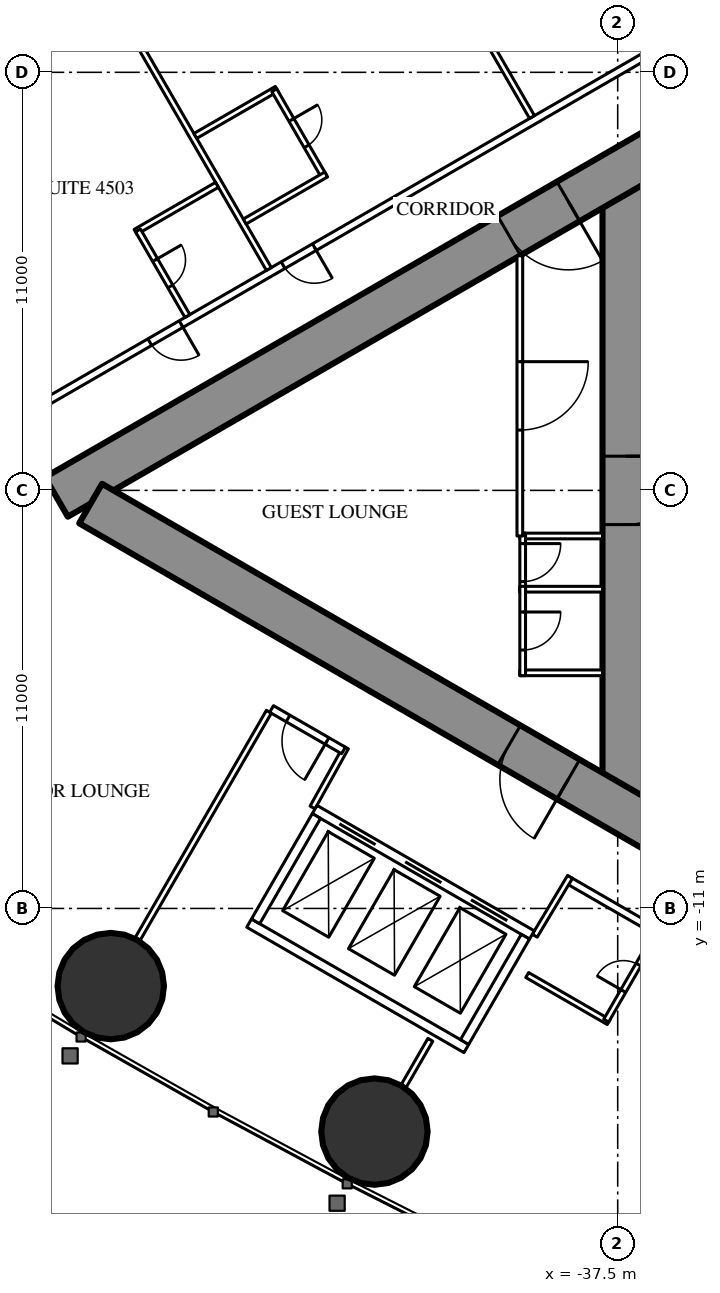
"""IFC4 building model, lengths in metres.
Left out: names, types, materials, properties, quantities, classifications, styles, units other than length and angle.
Written with IfcOpenShell. Run it as: python <this file> out.ifc"""

import sys

from ifc_helpers import new_model, si_unit, direction, frame, frame_2d, origin, origin_2d, place, context, subcontext, project, spatial, rectangle, circle, extrude, element, fill, save


model = new_model("IFC4")
c1 = context("Model", 3, precision=1e-05, world=origin(), true_north=direction((0.0, 1.0)))
c2 = subcontext(c1, "Body", "Model", "MODEL_VIEW")
j1 = project(units=[si_unit("LENGTHUNIT", "METRE"), si_unit("PLANEANGLEUNIT", "RADIAN")], contexts=[c1])
p1 = place(None, origin())
s1 = spatial("IfcSite", under=j1, at=p1, CompositionType="ELEMENT")
p2 = place(p1, origin())
s2 = spatial("IfcBuilding", under=s1, at=p2, CompositionType="ELEMENT")
p3 = place(p2, frame((0.0, 0.0, 170.3)))
s3 = spatial("IfcBuildingStorey", under=s2, at=p3, CompositionType="ELEMENT", Elevation=170.3)
for number, where, z_axis, x_axis in (
    (1, (-50.839, -13.043, 0.0), (0.0, 0.0, 1.0), (1.0, 0.0, 0.0)),
    (2, (-43.9, -16.871, 0.0), (0.0, 0.0, 1.0), (1.0, 0.0, 0.0)),
):
    element("IfcColumn", number, at=place(p3, frame(where, z_axis=z_axis, x_axis=x_axis)), inside=s3, PredefinedType="COLUMN", context=c2, shape_type="SweptSolid", body=[
        extrude(circle(Radius=1.4, at=origin_2d()), origin(), (0.0, 0.0, 1.0), 3.5),
    ])
p4 = place(p3, frame((-37.3, 8.6, 0.0), z_axis=(0.0, 0.0, 1.0), x_axis=(0.0, -1.0, 0.0)))
e3 = element("IfcWall", 3, at=p4, inside=s3, PredefinedType="SHEAR", context=c2, shape_type="SweptSolid", body=[
    extrude(rectangle(XDim=17.2, YDim=1.2, at=frame_2d((8.6, 0.0))), origin(), (0.0, 0.0, 1.0), 3.5),
])
p5 = place(p4, frame((7.7, 0.0, 0.0)))
e4 = element("IfcOpeningElement", 4, at=p5, cuts=e3, PredefinedType="OPENING", context=c2, shape_type="SweptSolid", body=[
    extrude(rectangle(XDim=1.8, YDim=2.2, at=frame_2d((0.9, 1.1))), frame((0.0, 0.61, 0.0), z_axis=(0.0, -1.0, 0.0), x_axis=(1.0, 0.0, 0.0)), (0.0, 0.0, 1.0), 1.22),
])
p6 = place(p3, frame((-27.2, 14.3, 0.0), z_axis=(0.0, 0.0, 1.0), x_axis=(-0.866026593062, -0.499997940104, 0.0)))
e5 = element("IfcWall", 5, at=p6, inside=s3, PredefinedType="SHEAR", context=c2, shape_type="SweptSolid", body=[
    extrude(rectangle(XDim=28.946, YDim=1.2, at=frame_2d((14.473, 0.0))), origin(), (0.0, 0.0, 1.0), 3.5),
])
p7 = place(p6, frame((4.6, 0.0, 0.0)))
e6 = element("IfcOpeningElement", 6, at=p7, cuts=e5, PredefinedType="OPENING", context=c2, shape_type="SweptSolid", body=[
    extrude(rectangle(XDim=1.0, YDim=2.2, at=frame_2d((0.5, 1.1))), frame((0.0, 0.61, 0.0), z_axis=(0.0, -1.0, 0.0), x_axis=(1.0, 0.0, 0.0)), (0.0, 0.0, 1.0), 1.22),
])
p8 = place(p6, frame((13.395, 0.0, 0.0)))
e7 = element("IfcOpeningElement", 7, at=p8, cuts=e5, PredefinedType="OPENING", context=c2, shape_type="SweptSolid", body=[
    extrude(rectangle(XDim=1.8, YDim=2.2, at=frame_2d((0.9, 1.1))), frame((0.0, 0.61, 0.0), z_axis=(0.0, -1.0, 0.0), x_axis=(1.0, 0.0, 0.0)), (0.0, 0.0, 1.0), 1.22),
])
p9 = place(p3, frame((-27.2, -14.3, 0.0), z_axis=(0.0, 0.0, 1.0), x_axis=(-0.866024021859, 0.500002393557, 0.0)))
e8 = element("IfcWall", 8, at=p9, inside=s3, PredefinedType="SHEAR", context=c2, shape_type="SweptSolid", body=[
    extrude(rectangle(XDim=27.907, YDim=1.2, at=frame_2d((13.954, 0.0))), origin(), (0.0, 0.0, 1.0), 3.5),
])
p10 = place(p9, frame((4.6, 0.0, 0.0)))
e9 = element("IfcOpeningElement", 9, at=p10, cuts=e8, PredefinedType="OPENING", context=c2, shape_type="SweptSolid", body=[
    extrude(rectangle(XDim=1.0, YDim=2.2, at=frame_2d((0.5, 1.1))), frame((0.0, 0.61, 0.0), z_axis=(0.0, -1.0, 0.0), x_axis=(1.0, 0.0, 0.0)), (0.0, 0.0, 1.0), 1.22),
])
p11 = place(p9, frame((13.395, 0.0, 0.0)))
e10 = element("IfcOpeningElement", 10, at=p11, cuts=e8, PredefinedType="OPENING", context=c2, shape_type="SweptSolid", body=[
    extrude(rectangle(XDim=1.8, YDim=2.2, at=frame_2d((0.9, 1.1))), frame((0.0, 0.61, 0.0), z_axis=(0.0, -1.0, 0.0), x_axis=(1.0, 0.0, 0.0)), (0.0, 0.0, 1.0), 1.22),
])
p12 = place(p3, frame((-27.86, 16.575, 0.0), z_axis=(0.0, 0.0, 1.0), x_axis=(-0.866025533911, -0.499999774615, 0.0)))
e11 = element("IfcWall", 11, at=p12, inside=s3, PredefinedType="PARTITIONING", context=c2, shape_type="SweptSolid", body=[
    extrude(rectangle(XDim=33.149, YDim=0.2, at=frame_2d((16.575, 0.0))), origin(), (0.0, 0.0, 1.0), 3.25),
])
p13 = place(p12, frame((3.75, 0.0, 0.0)))
e12 = element("IfcOpeningElement", 12, at=p13, cuts=e11, PredefinedType="OPENING", context=c2, shape_type="SweptSolid", body=[
    extrude(rectangle(XDim=1.0, YDim=2.2, at=frame_2d((0.5, 1.1))), frame((0.0, 0.11, 0.0), z_axis=(0.0, -1.0, 0.0), x_axis=(1.0, 0.0, 0.0)), (0.0, 0.0, 1.0), 0.22),
])
p14 = place(p12, frame((20.347, 0.0, 0.0)))
e13 = element("IfcOpeningElement", 13, at=p14, cuts=e11, PredefinedType="OPENING", context=c2, shape_type="SweptSolid", body=[
    extrude(rectangle(XDim=0.95, YDim=2.2, at=frame_2d((0.475, 1.1))), frame((0.0, 0.11, 0.0), z_axis=(0.0, -1.0, 0.0), x_axis=(1.0, 0.0, 0.0)), (0.0, 0.0, 1.0), 0.22),
])
p15 = place(p12, frame((24.397, 0.0, 0.0)))
e14 = element("IfcOpeningElement", 14, at=p15, cuts=e11, PredefinedType="OPENING", context=c2, shape_type="SweptSolid", body=[
    extrude(rectangle(XDim=0.95, YDim=2.2, at=frame_2d((0.475, 1.1))), frame((0.0, 0.11, 0.0), z_axis=(0.0, -1.0, 0.0), x_axis=(1.0, 0.0, 0.0)), (0.0, 0.0, 1.0), 0.22),
])
p16 = place(p12, frame((30.042, 0.0, 0.0)))
e15 = element("IfcOpeningElement", 15, at=p16, cuts=e11, PredefinedType="OPENING", context=c2, shape_type="SweptSolid", body=[
    extrude(rectangle(XDim=0.95, YDim=2.2, at=frame_2d((0.475, 1.1))), frame((0.0, 0.11, 0.0), z_axis=(0.0, -1.0, 0.0), x_axis=(1.0, 0.0, 0.0)), (0.0, 0.0, 1.0), 0.22),
])
p17 = place(p3, frame((-39.754, 9.823, 0.0), z_axis=(0.0, 0.0, 1.0), x_axis=(-0.499997670926, 0.866026748472, 0.0)))
e16 = element("IfcWall", 16, at=p17, inside=s3, PredefinedType="PARTITIONING", context=c2, shape_type="SweptSolid", body=[
    extrude(rectangle(XDim=6.757, YDim=0.15, at=frame_2d((3.379, 0.0))), origin(), (0.0, 0.0, 1.0), 2.3),
])
for number, where, z_axis, x_axis in (
    (17, (-46.679, 5.825, 0.0), (0.0, 0.0, 1.0), (-0.5, 0.866, 0.0)),
    (18, (-46.679, -5.825, 0.0), (0.0, 0.0, 1.0), (-0.5, -0.866, 0.0)),
):
    element("IfcWall", number, at=place(p3, frame(where, z_axis=z_axis, x_axis=x_axis)), inside=s3, PredefinedType="PARTITIONING", context=c2, shape_type="SweptSolid", body=[
        extrude(rectangle(XDim=6.911, YDim=0.15, at=frame_2d((3.456, 0.0))), origin(), (0.0, 0.0, 1.0), 2.3),
    ])
p18 = place(p3, frame((-42.429, -14.457, 0.0), z_axis=(0.0, 0.0, 1.0), x_axis=(-0.5000578829, -0.865991982497, 0.0)))
e19 = element("IfcWall", 19, at=p18, inside=s3, PredefinedType="PARTITIONING", context=c2, shape_type="SweptSolid", body=[
    extrude(rectangle(XDim=1.407, YDim=0.15, at=frame_2d((0.704, 0.0))), origin(), (0.0, 0.0, 1.0), 3.25),
])
p19 = place(p3, frame((-27.86, -16.575, 0.0), z_axis=(0.0, 0.0, 1.0), x_axis=(-0.866027756871, 0.499995924312, 0.0)))
e20 = element("IfcWall", 20, at=p19, inside=s3, PredefinedType="PARTITIONING", context=c2, shape_type="SweptSolid", body=[
    extrude(rectangle(XDim=12.622, YDim=0.2, at=frame_2d((6.311, 0.0))), origin(), (0.0, 0.0, 1.0), 3.25),
])
p20 = place(p19, frame((8.722, 0.0, 0.0)))
e21 = element("IfcOpeningElement", 21, at=p20, cuts=e20, PredefinedType="OPENING", context=c2, shape_type="SweptSolid", body=[
    extrude(rectangle(XDim=0.95, YDim=2.2, at=frame_2d((0.475, 1.1))), frame((0.0, 0.11, 0.0), z_axis=(0.0, -1.0, 0.0), x_axis=(1.0, 0.0, 0.0)), (0.0, 0.0, 1.0), 0.22),
])
for number, where, z_axis, x_axis in (
    (22, (-39.683, -11.718, 0.0), (0.0, 0.0, 1.0), (0.514, 0.858, 0.0)),
    (23, (-44.652, -6.764, 0.0), (0.0, 0.0, 1.0), (-0.485, -0.874, 0.0)),
):
    element("IfcWall", number, at=place(p3, frame(where, z_axis=z_axis, x_axis=x_axis)), inside=s3, PredefinedType="PARTITIONING", context=c2, shape_type="SweptSolid", body=[
        extrude(rectangle(XDim=1.805, YDim=0.15, at=frame_2d((0.903, 0.0))), origin(), (0.0, 0.0, 1.0), 3.25),
    ])
p21 = place(p3, frame((-44.715, -6.844, 0.0), z_axis=(0.0, 0.0, 1.0), x_axis=(-0.865999496279, 0.500044870432, 0.0)))
e24 = element("IfcWall", 24, at=p21, inside=s3, PredefinedType="PARTITIONING", context=c2, shape_type="SweptSolid", body=[
    extrude(rectangle(XDim=2.185, YDim=0.2, at=frame_2d((1.092, 0.0))), origin(), (0.0, 0.0, 1.0), 3.25),
])
p22 = place(p21, frame((0.5, 0.0, 0.0)))
e25 = element("IfcOpeningElement", 25, at=p22, cuts=e24, PredefinedType="OPENING", context=c2, shape_type="SweptSolid", body=[
    extrude(rectangle(XDim=1.185, YDim=2.2, at=frame_2d((0.593, 1.1))), frame((0.0, 0.11, 0.0), z_axis=(0.0, -1.0, 0.0), x_axis=(1.0, 0.0, 0.0)), (0.0, 0.0, 1.0), 0.22),
])
p23 = place(p3, frame((-46.47, 10.564, 0.0), z_axis=(0.0, 0.0, 1.0), x_axis=(-0.866006523861, -0.500032699561, 0.0)))
e26 = element("IfcWall", 26, at=p23, inside=s3, PredefinedType="PARTITIONING", context=c2, shape_type="SweptSolid", body=[
    extrude(rectangle(XDim=2.475, YDim=0.15, at=frame_2d((1.237, 0.0))), origin(), (0.0, 0.0, 1.0), 3.25),
])
p24 = place(p3, frame((-45.235, 8.275, 0.0), z_axis=(0.0, 0.0, 1.0), x_axis=(-0.500006934395, 0.866021400173, 0.0)))
e27 = element("IfcWall", 27, at=p24, inside=s3, PredefinedType="PARTITIONING", context=c2, shape_type="SweptSolid", body=[
    extrude(rectangle(XDim=2.6, YDim=0.15, at=frame_2d((1.3, 0.0))), origin(), (0.0, 0.0, 1.0), 3.25),
])
p25 = place(p24, frame((0.9, 0.0, 0.0)))
e28 = element("IfcOpeningElement", 28, at=p25, cuts=e27, PredefinedType="OPENING", context=c2, shape_type="SweptSolid", body=[
    extrude(rectangle(XDim=0.8, YDim=2.2, at=frame_2d((0.4, 1.1))), frame((0.0, 0.085, 0.0), z_axis=(0.0, -1.0, 0.0), x_axis=(1.0, 0.0, 0.0)), (0.0, 0.0, 1.0), 0.17),
])
for number, where, z_axis, x_axis in (
    (29, (-45.17, 8.312, 0.0), (0.0, 0.0, 1.0), (-0.866, -0.5, 0.0)),
    (30, (-48.044, 8.039, 0.0), (0.0, 0.0, 1.0), (-0.866, -0.5, 0.0)),
):
    element("IfcWall", number, at=place(p3, frame(where, z_axis=z_axis, x_axis=x_axis)), inside=s3, PredefinedType="PARTITIONING", context=c2, shape_type="SweptSolid", body=[
        extrude(rectangle(XDim=2.475, YDim=0.15, at=frame_2d((1.238, 0.0))), origin(), (0.0, 0.0, 1.0), 3.25),
    ])
p26 = place(p3, frame((-48.822, 4.588, 0.0), z_axis=(0.0, 0.0, 1.0), x_axis=(-0.500006934395, 0.866021400173, 0.0)))
e31 = element("IfcWall", 31, at=p26, inside=s3, PredefinedType="PARTITIONING", context=c2, shape_type="SweptSolid", body=[
    extrude(rectangle(XDim=2.6, YDim=0.15, at=frame_2d((1.3, 0.0))), origin(), (0.0, 0.0, 1.0), 3.25),
])
p27 = place(p26, frame((0.9, 0.0, 0.0)))
e32 = element("IfcOpeningElement", 32, at=p27, cuts=e31, PredefinedType="OPENING", context=c2, shape_type="SweptSolid", body=[
    extrude(rectangle(XDim=0.8, YDim=2.2, at=frame_2d((0.4, 1.1))), frame((0.0, 0.085, 0.0), z_axis=(0.0, -1.0, 0.0), x_axis=(1.0, 0.0, 0.0)), (0.0, 0.0, 1.0), 0.17),
])
p28 = place(p3, frame((-37.738, -13.989, 0.0), z_axis=(0.0, 0.0, 1.0), x_axis=(-0.86604923931, 0.499958713387, 0.0)))
e33 = element("IfcWall", 33, at=p28, inside=s3, PredefinedType="PARTITIONING", context=c2, shape_type="SweptSolid", body=[
    extrude(rectangle(XDim=2.475, YDim=0.15, at=frame_2d((1.237, 0.0))), origin(), (0.0, 0.0, 1.0), 3.25),
])
p29 = place(p3, frame((-36.503, -11.7, 0.0), z_axis=(0.0, 0.0, 1.0), x_axis=(-0.500006934395, -0.866021400173, 0.0)))
e34 = element("IfcWall", 34, at=p29, inside=s3, PredefinedType="PARTITIONING", context=c2, shape_type="SweptSolid", body=[
    extrude(rectangle(XDim=2.6, YDim=0.15, at=frame_2d((1.3, 0.0))), origin(), (0.0, 0.0, 1.0), 3.25),
])
p30 = place(p29, frame((0.9, 0.0, 0.0)))
e35 = element("IfcOpeningElement", 35, at=p30, cuts=e34, PredefinedType="OPENING", context=c2, shape_type="SweptSolid", body=[
    extrude(rectangle(XDim=0.8, YDim=2.2, at=frame_2d((0.4, 1.1))), frame((0.0, 0.085, 0.0), z_axis=(0.0, -1.0, 0.0), x_axis=(1.0, 0.0, 0.0)), (0.0, 0.0, 1.0), 0.17),
])
for number, where, z_axis, x_axis in (
    (36, (-37.9, -1.2, 0.0), (0.0, 0.0, 1.0), (-1.0, 0.0, 0.0)),
    (37, (-37.9, -2.6, 0.0), (0.0, 0.0, 1.0), (-1.0, 0.0, 0.0)),
    (38, (-37.9, -4.8, 0.0), (0.0, 0.0, 1.0), (-1.0, 0.0, 0.0)),
):
    element("IfcWall", number, at=place(p3, frame(where, z_axis=z_axis, x_axis=x_axis)), inside=s3, PredefinedType="PARTITIONING", context=c2, shape_type="SweptSolid", body=[
        extrude(rectangle(XDim=2.175, YDim=0.15, at=frame_2d((1.087, 0.0))), origin(), (0.0, 0.0, 1.0), 3.25),
    ])
p31 = place(p3, frame((-40.0, -1.125, 0.0), z_axis=(0.0, 0.0, 1.0), x_axis=(0.0, -1.0, 0.0)))
e39 = element("IfcWall", 39, at=p31, inside=s3, PredefinedType="PARTITIONING", context=c2, shape_type="SweptSolid", body=[
    extrude(rectangle(XDim=1.55, YDim=0.15, at=frame_2d((0.775, 0.0))), origin(), (0.0, 0.0, 1.0), 3.25),
])
p32 = place(p31, frame((0.275, 0.0, 0.0)))
e40 = element("IfcOpeningElement", 40, at=p32, cuts=e39, PredefinedType="OPENING", context=c2, shape_type="SweptSolid", body=[
    extrude(rectangle(XDim=1.0, YDim=2.2, at=frame_2d((0.5, 1.1))), frame((0.0, 0.085, 0.0), z_axis=(0.0, -1.0, 0.0), x_axis=(1.0, 0.0, 0.0)), (0.0, 0.0, 1.0), 0.17),
])
p33 = place(p3, frame((-40.0, -2.525, 0.0), z_axis=(0.0, 0.0, 1.0), x_axis=(0.0, -1.0, 0.0)))
e41 = element("IfcWall", 41, at=p33, inside=s3, PredefinedType="PARTITIONING", context=c2, shape_type="SweptSolid", body=[
    extrude(rectangle(XDim=2.35, YDim=0.15, at=frame_2d((1.175, 0.0))), origin(), (0.0, 0.0, 1.0), 3.25),
])
p34 = place(p33, frame((0.675, 0.0, 0.0)))
e42 = element("IfcOpeningElement", 42, at=p34, cuts=e41, PredefinedType="OPENING", context=c2, shape_type="SweptSolid", body=[
    extrude(rectangle(XDim=1.0, YDim=2.2, at=frame_2d((0.5, 1.1))), frame((0.0, 0.085, 0.0), z_axis=(0.0, -1.0, 0.0), x_axis=(1.0, 0.0, 0.0)), (0.0, 0.0, 1.0), 0.17),
])
p35 = place(p3, frame((-40.075, 6.174, 0.0), z_axis=(0.0, 0.0, 1.0), x_axis=(0.0, -1.0, 0.0)))
e43 = element("IfcWall", 43, at=p35, inside=s3, PredefinedType="PARTITIONING", context=c2, shape_type="SweptSolid", body=[
    extrude(rectangle(XDim=7.374, YDim=0.15, at=frame_2d((3.687, 0.0))), origin(), (0.0, 0.0, 1.0), 3.25),
])
p36 = place(p35, frame((2.787, 0.0, 0.0)))
e44 = element("IfcOpeningElement", 44, at=p36, cuts=e43, PredefinedType="OPENING", context=c2, shape_type="SweptSolid", body=[
    extrude(rectangle(XDim=1.8, YDim=2.2, at=frame_2d((0.9, 1.1))), frame((0.0, 0.085, 0.0), z_axis=(0.0, -1.0, 0.0), x_axis=(1.0, 0.0, 0.0)), (0.0, 0.0, 1.0), 0.17),
])
p37 = place(p3, frame((-39.758, -11.697, 0.0), z_axis=(0.0, 0.0, 1.0), x_axis=(-0.866024194504, 0.500002094529, 0.0)))
e45 = element("IfcWall", 45, at=p37, inside=s3, PredefinedType="PARTITIONING", context=c2, shape_type="SweptSolid", body=[
    extrude(rectangle(XDim=6.6, YDim=0.25, at=frame_2d((3.3, 0.0))), origin(), (0.0, 0.0, 1.0), 3.25),
])
p38 = place(p37, frame((0.75, 0.0, 0.0)))
e46 = element("IfcOpeningElement", 46, at=p38, cuts=e45, PredefinedType="OPENING", context=c2, shape_type="SweptSolid", body=[
    extrude(rectangle(XDim=1.1, YDim=2.2, at=frame_2d((0.55, 1.1))), frame((0.0, 0.135, 0.0), z_axis=(0.0, -1.0, 0.0), x_axis=(1.0, 0.0, 0.0)), (0.0, 0.0, 1.0), 0.27),
])
p39 = place(p37, frame((2.75, 0.0, 0.0)))
e47 = element("IfcOpeningElement", 47, at=p39, cuts=e45, PredefinedType="OPENING", context=c2, shape_type="SweptSolid", body=[
    extrude(rectangle(XDim=1.1, YDim=2.2, at=frame_2d((0.55, 1.1))), frame((0.0, 0.135, 0.0), z_axis=(0.0, -1.0, 0.0), x_axis=(1.0, 0.0, 0.0)), (0.0, 0.0, 1.0), 0.27),
])
p40 = place(p37, frame((4.75, 0.0, 0.0)))
e48 = element("IfcOpeningElement", 48, at=p40, cuts=e45, PredefinedType="OPENING", context=c2, shape_type="SweptSolid", body=[
    extrude(rectangle(XDim=1.1, YDim=2.2, at=frame_2d((0.55, 1.1))), frame((0.0, 0.135, 0.0), z_axis=(0.0, -1.0, 0.0), x_axis=(1.0, 0.0, 0.0)), (0.0, 0.0, 1.0), 0.27),
])
p41 = place(p3, frame((-41.482, -14.686, 0.0), z_axis=(0.0, 0.0, 1.0), x_axis=(-0.86603344179, 0.499986077507, 0.0)))
e49 = element("IfcWall", 49, at=p41, inside=s3, PredefinedType="PARTITIONING", context=c2, shape_type="SweptSolid", body=[
    extrude(rectangle(XDim=6.6, YDim=0.25, at=frame_2d((3.3, 0.0))), origin(), (0.0, 0.0, 1.0), 3.25),
])
for number, where, z_axis, x_axis in (
    (50, (-39.928, -11.743, 0.0), (0.0, 0.0, 1.0), (-0.5, -0.866, 0.0)),
    (51, (-45.428, -8.568, 0.0), (0.0, 0.0, 1.0), (-0.5, -0.866, 0.0)),
):
    element("IfcWall", number, at=place(p3, frame(where, z_axis=z_axis, x_axis=x_axis)), inside=s3, PredefinedType="PARTITIONING", context=c2, shape_type="SweptSolid", body=[
        extrude(rectangle(XDim=3.201, YDim=0.25, at=frame_2d((1.6, 0.0))), origin(), (0.0, 0.0, 1.0), 3.25),
    ])
p42 = place(p25, origin())
e52 = element("IfcDoor", 52, at=p42, inside=s3, OperationType="SINGLE_SWING_RIGHT", PredefinedType="DOOR", context=c2, shape_type="SweptSolid", body=[
    extrude(rectangle(XDim=0.8, YDim=2.2, at=frame_2d((0.4, 1.1))), frame((0.0, 0.025, 0.0), z_axis=(0.0, -1.0, 0.0), x_axis=(1.0, 0.0, 0.0)), (0.0, 0.0, 1.0), 0.05),
])
fill(e28, e52)
p43 = place(p14, origin())
e53 = element("IfcDoor", 53, at=p43, inside=s3, OperationType="SINGLE_SWING_LEFT", PredefinedType="DOOR", context=c2, shape_type="SweptSolid", body=[
    extrude(rectangle(XDim=0.95, YDim=2.2, at=frame_2d((0.475, 1.1))), frame((0.0, 0.025, 0.0), z_axis=(0.0, -1.0, 0.0), x_axis=(1.0, 0.0, 0.0)), (0.0, 0.0, 1.0), 0.05),
])
fill(e13, e53)
p44 = place(p27, origin())
e54 = element("IfcDoor", 54, at=p44, inside=s3, OperationType="SINGLE_SWING_RIGHT", PredefinedType="DOOR", context=c2, shape_type="SweptSolid", body=[
    extrude(rectangle(XDim=0.8, YDim=2.2, at=frame_2d((0.4, 1.1))), frame((0.0, 0.025, 0.0), z_axis=(0.0, -1.0, 0.0), x_axis=(1.0, 0.0, 0.0)), (0.0, 0.0, 1.0), 0.05),
])
fill(e32, e54)
p45 = place(p15, origin())
e55 = element("IfcDoor", 55, at=p45, inside=s3, OperationType="SINGLE_SWING_LEFT", PredefinedType="DOOR", context=c2, shape_type="SweptSolid", body=[
    extrude(rectangle(XDim=0.95, YDim=2.2, at=frame_2d((0.475, 1.1))), frame((0.0, 0.025, 0.0), z_axis=(0.0, -1.0, 0.0), x_axis=(1.0, 0.0, 0.0)), (0.0, 0.0, 1.0), 0.05),
])
fill(e14, e55)
p46 = place(p30, origin())
e56 = element("IfcDoor", 56, at=p46, inside=s3, OperationType="SINGLE_SWING_RIGHT", PredefinedType="DOOR", context=c2, shape_type="SweptSolid", body=[
    extrude(rectangle(XDim=0.8, YDim=2.2, at=frame_2d((0.4, 1.1))), frame((0.0, 0.025, 0.0), z_axis=(0.0, -1.0, 0.0), x_axis=(1.0, 0.0, 0.0)), (0.0, 0.0, 1.0), 0.05),
])
fill(e35, e56)
p47 = place(p22, origin())
e57 = element("IfcDoor", 57, at=p47, inside=s3, OperationType="SINGLE_SWING_LEFT", PredefinedType="DOOR", context=c2, shape_type="SweptSolid", body=[
    extrude(rectangle(XDim=1.185, YDim=2.2, at=frame_2d((0.593, 1.1))), frame((0.0, 0.025, 0.0), z_axis=(0.0, -1.0, 0.0), x_axis=(1.0, 0.0, 0.0)), (0.0, 0.0, 1.0), 0.05),
])
fill(e25, e57)
p48 = place(p32, origin())
e58 = element("IfcDoor", 58, at=p48, inside=s3, OperationType="SINGLE_SWING_LEFT", PredefinedType="DOOR", context=c2, shape_type="SweptSolid", body=[
    extrude(rectangle(XDim=1.0, YDim=2.2, at=frame_2d((0.5, 1.1))), frame((0.0, 0.025, 0.0), z_axis=(0.0, -1.0, 0.0), x_axis=(1.0, 0.0, 0.0)), (0.0, 0.0, 1.0), 0.05),
])
fill(e40, e58)
p49 = place(p34, origin())
e59 = element("IfcDoor", 59, at=p49, inside=s3, OperationType="SINGLE_SWING_LEFT", PredefinedType="DOOR", context=c2, shape_type="SweptSolid", body=[
    extrude(rectangle(XDim=1.0, YDim=2.2, at=frame_2d((0.5, 1.1))), frame((0.0, 0.025, 0.0), z_axis=(0.0, -1.0, 0.0), x_axis=(1.0, 0.0, 0.0)), (0.0, 0.0, 1.0), 0.05),
])
fill(e42, e59)
p50 = place(p36, origin())
e60 = element("IfcDoor", 60, at=p50, inside=s3, OperationType="DOUBLE_DOOR_SINGLE_SWING", PredefinedType="DOOR", context=c2, shape_type="SweptSolid", body=[
    extrude(rectangle(XDim=1.8, YDim=2.2, at=frame_2d((0.9, 1.1))), frame((0.0, 0.025, 0.0), z_axis=(0.0, -1.0, 0.0), x_axis=(1.0, 0.0, 0.0)), (0.0, 0.0, 1.0), 0.05),
])
fill(e44, e60)
p51 = place(p8, origin())
e61 = element("IfcDoor", 61, at=p51, inside=s3, OperationType="DOUBLE_DOOR_SINGLE_SWING", PredefinedType="DOOR", context=c2, shape_type="SweptSolid", body=[
    extrude(rectangle(XDim=1.8, YDim=2.2, at=frame_2d((0.9, 1.1))), frame((0.0, 0.025, 0.0), z_axis=(0.0, -1.0, 0.0), x_axis=(1.0, 0.0, 0.0)), (0.0, 0.0, 1.0), 0.05),
])
fill(e7, e61)
p52 = place(p11, origin())
e62 = element("IfcDoor", 62, at=p52, inside=s3, OperationType="DOUBLE_DOOR_SINGLE_SWING", PredefinedType="DOOR", context=c2, shape_type="SweptSolid", body=[
    extrude(rectangle(XDim=1.8, YDim=2.2, at=frame_2d((0.9, 1.1))), frame((0.0, 0.025, 0.0), z_axis=(0.0, -1.0, 0.0), x_axis=(1.0, 0.0, 0.0)), (0.0, 0.0, 1.0), 0.05),
])
fill(e10, e62)
p53 = place(p5, origin())
e63 = element("IfcDoor", 63, at=p53, inside=s3, OperationType="DOUBLE_DOOR_SINGLE_SWING", PredefinedType="DOOR", context=c2, shape_type="SweptSolid", body=[
    extrude(rectangle(XDim=1.8, YDim=2.2, at=frame_2d((0.9, 1.1))), frame((0.0, 0.025, 0.0), z_axis=(0.0, -1.0, 0.0), x_axis=(1.0, 0.0, 0.0)), (0.0, 0.0, 1.0), 0.05),
])
fill(e4, e63)
p54 = place(p38, origin())
e64 = element("IfcDoor", 64, at=p54, inside=s3, OperationType="DOUBLE_DOOR_SLIDING", PredefinedType="USERDEFINED", context=c2, shape_type="SweptSolid", body=[
    extrude(rectangle(XDim=1.1, YDim=2.2, at=frame_2d((0.55, 1.1))), frame((0.0, 0.025, 0.0), z_axis=(0.0, -1.0, 0.0), x_axis=(1.0, 0.0, 0.0)), (0.0, 0.0, 1.0), 0.05),
])
fill(e46, e64)
p55 = place(p39, origin())
e65 = element("IfcDoor", 65, at=p55, inside=s3, OperationType="DOUBLE_DOOR_SLIDING", PredefinedType="USERDEFINED", context=c2, shape_type="SweptSolid", body=[
    extrude(rectangle(XDim=1.1, YDim=2.2, at=frame_2d((0.55, 1.1))), frame((0.0, 0.025, 0.0), z_axis=(0.0, -1.0, 0.0), x_axis=(1.0, 0.0, 0.0)), (0.0, 0.0, 1.0), 0.05),
])
fill(e47, e65)
p56 = place(p40, origin())
e66 = element("IfcDoor", 66, at=p56, inside=s3, OperationType="DOUBLE_DOOR_SLIDING", PredefinedType="USERDEFINED", context=c2, shape_type="SweptSolid", body=[
    extrude(rectangle(XDim=1.1, YDim=2.2, at=frame_2d((0.55, 1.1))), frame((0.0, 0.025, 0.0), z_axis=(0.0, -1.0, 0.0), x_axis=(1.0, 0.0, 0.0)), (0.0, 0.0, 1.0), 0.05),
])
fill(e48, e66)
save(model, sys.argv[1])
